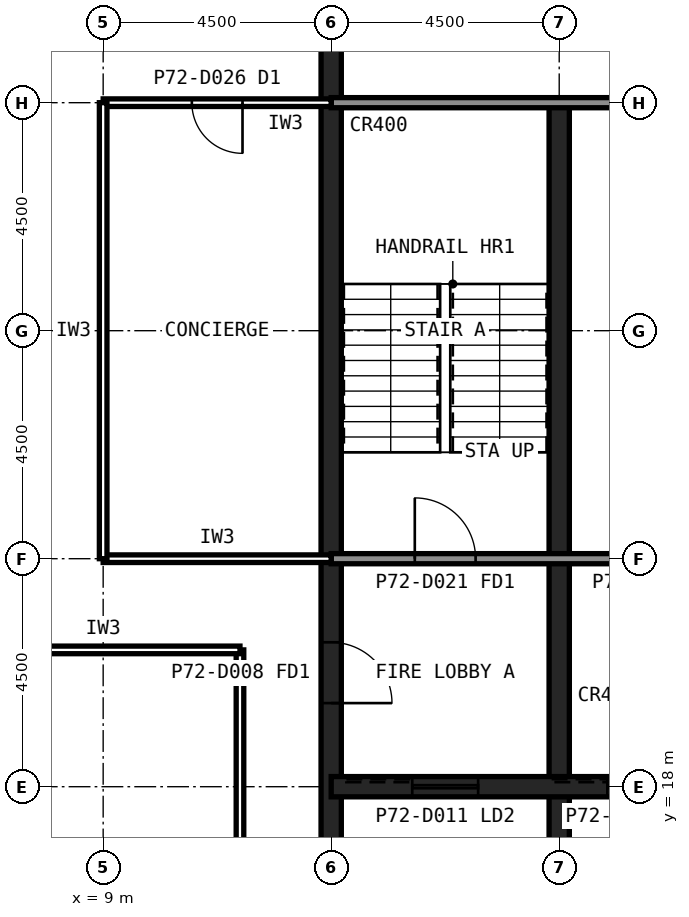
"""IFC4 building model, lengths in metres.
Left out: names, types, materials, properties, quantities, classifications, styles, units other than length and angle.
Written with IfcOpenShell. Run it as: python <this file> out.ifc"""

import sys

from ifc_helpers import new_model, si_unit, direction, frame, frame_2d, origin, place, context, subcontext, project, spatial, rectangle, extrude, element, fill, save


model = new_model("IFC4")
c1 = context("Model", 3, precision=1e-05, world=origin(), true_north=direction((0.0, 1.0)))
c2 = subcontext(c1, "Body", "Model", "MODEL_VIEW")
j1 = project(units=[si_unit("LENGTHUNIT", "METRE"), si_unit("PLANEANGLEUNIT", "RADIAN")], contexts=[c1])
p1 = place(None, origin())
s1 = spatial("IfcSite", under=j1, at=p1, CompositionType="ELEMENT")
p2 = place(p1, origin())
s2 = spatial("IfcBuilding", under=s1, at=p2, CompositionType="ELEMENT")
p3 = place(p2, frame((0.0, 0.0, 302.6)))
s3 = spatial("IfcBuildingStorey", under=s2, at=p3, CompositionType="ELEMENT", Elevation=302.6)
p4 = place(p3, frame((13.5, 40.5, 0.0), z_axis=(0.0, 0.0, 1.0), x_axis=(0.0, -1.0, 0.0)))
e1 = element("IfcWall", 1, at=p4, inside=s3, PredefinedType="SHEAR", context=c2, shape_type="SweptSolid", body=[
    extrude(rectangle(XDim=27.0, YDim=0.4, at=frame_2d((13.5, 0.0))), origin(), (0.0, 0.0, 1.0), 4.0),
])
p5 = place(p4, frame((19.65, 0.0, 0.0)))
e2 = element("IfcOpeningElement", 2, at=p5, cuts=e1, PredefinedType="OPENING", context=c2, shape_type="SweptSolid", body=[
    extrude(rectangle(XDim=1.2, YDim=2.1, at=frame_2d((0.6, 1.05))), frame((0.0, 0.21, 0.0), z_axis=(0.0, -1.0, 0.0), x_axis=(1.0, 0.0, 0.0)), (0.0, 0.0, 1.0), 0.42),
])
p6 = place(p4, frame((5.85, 0.0, 0.0)))
e3 = element("IfcOpeningElement", 3, at=p6, cuts=e1, PredefinedType="OPENING", context=c2, shape_type="SweptSolid", body=[
    extrude(rectangle(XDim=1.8, YDim=2.1, at=frame_2d((0.9, 1.05))), frame((0.0, 0.21, 0.0), z_axis=(0.0, -1.0, 0.0), x_axis=(1.0, 0.0, 0.0)), (0.0, 0.0, 1.0), 0.42),
])
p7 = place(p3, frame((18.0, 13.5, 0.0), z_axis=(0.0, 0.0, 1.0), x_axis=(0.0, 1.0, 0.0)))
e4 = element("IfcWall", 4, at=p7, inside=s3, PredefinedType="SHEAR", context=c2, shape_type="SweptSolid", body=[
    extrude(rectangle(XDim=18.0, YDim=0.4, at=frame_2d((9.0, 0.0))), origin(), (0.0, 0.0, 1.0), 4.0),
])
p8 = place(p3, frame((13.5, 18.0, 0.0), z_axis=(0.0, 0.0, 1.0), x_axis=(1.0, 0.0, 0.0)))
e5 = element("IfcWall", 5, at=p8, inside=s3, PredefinedType="SHEAR", context=c2, shape_type="SweptSolid", body=[
    extrude(rectangle(XDim=27.0, YDim=0.4, at=frame_2d((13.5, 0.0))), origin(), (0.0, 0.0, 1.0), 4.0),
])
p9 = place(p8, frame((24.3, 0.0, 0.0)))
e6 = element("IfcOpeningElement", 6, at=p9, cuts=e5, PredefinedType="OPENING", context=c2, shape_type="SweptSolid", body=[
    extrude(rectangle(XDim=0.9, YDim=2.1, at=frame_2d((0.45, 1.05))), frame((0.0, 0.21, 0.0), z_axis=(0.0, -1.0, 0.0), x_axis=(1.0, 0.0, 0.0)), (0.0, 0.0, 1.0), 0.42),
])
p10 = place(p8, frame((5.45, 0.0, 0.0)))
e7 = element("IfcOpeningElement", 7, at=p10, cuts=e5, PredefinedType="OPENING", context=c2, shape_type="SweptSolid", body=[
    extrude(rectangle(XDim=1.1, YDim=2.1, at=frame_2d((0.55, 1.05))), frame((0.0, 0.21, 0.0), z_axis=(0.0, -1.0, 0.0), x_axis=(1.0, 0.0, 0.0)), (0.0, 0.0, 1.0), 0.42),
])
p11 = place(p8, frame((8.45, 0.0, 0.0)))
e8 = element("IfcOpeningElement", 8, at=p11, cuts=e5, PredefinedType="OPENING", context=c2, shape_type="SweptSolid", body=[
    extrude(rectangle(XDim=1.1, YDim=2.1, at=frame_2d((0.55, 1.05))), frame((0.0, 0.21, 0.0), z_axis=(0.0, -1.0, 0.0), x_axis=(1.0, 0.0, 0.0)), (0.0, 0.0, 1.0), 0.42),
])
p12 = place(p8, frame((11.45, 0.0, 0.0)))
e9 = element("IfcOpeningElement", 9, at=p12, cuts=e5, PredefinedType="OPENING", context=c2, shape_type="SweptSolid", body=[
    extrude(rectangle(XDim=1.1, YDim=2.1, at=frame_2d((0.55, 1.05))), frame((0.0, 0.21, 0.0), z_axis=(0.0, -1.0, 0.0), x_axis=(1.0, 0.0, 0.0)), (0.0, 0.0, 1.0), 0.42),
])
p13 = place(p8, frame((14.45, 0.0, 0.0)))
e10 = element("IfcOpeningElement", 10, at=p13, cuts=e5, PredefinedType="OPENING", context=c2, shape_type="SweptSolid", body=[
    extrude(rectangle(XDim=1.1, YDim=2.1, at=frame_2d((0.55, 1.05))), frame((0.0, 0.21, 0.0), z_axis=(0.0, -1.0, 0.0), x_axis=(1.0, 0.0, 0.0)), (0.0, 0.0, 1.0), 0.42),
])
p14 = place(p8, frame((17.45, 0.0, 0.0)))
e11 = element("IfcOpeningElement", 11, at=p14, cuts=e5, PredefinedType="OPENING", context=c2, shape_type="SweptSolid", body=[
    extrude(rectangle(XDim=1.1, YDim=2.1, at=frame_2d((0.55, 1.05))), frame((0.0, 0.21, 0.0), z_axis=(0.0, -1.0, 0.0), x_axis=(1.0, 0.0, 0.0)), (0.0, 0.0, 1.0), 0.42),
])
p15 = place(p8, frame((20.45, 0.0, 0.0)))
e12 = element("IfcOpeningElement", 12, at=p15, cuts=e5, PredefinedType="OPENING", context=c2, shape_type="SweptSolid", body=[
    extrude(rectangle(XDim=1.1, YDim=2.1, at=frame_2d((0.55, 1.05))), frame((0.0, 0.21, 0.0), z_axis=(0.0, -1.0, 0.0), x_axis=(1.0, 0.0, 0.0)), (0.0, 0.0, 1.0), 0.42),
])
p16 = place(p8, frame((1.6, 0.0, 0.0)))
e13 = element("IfcOpeningElement", 13, at=p16, cuts=e5, PredefinedType="OPENING", context=c2, shape_type="SweptSolid", body=[
    extrude(rectangle(XDim=1.3, YDim=2.2, at=frame_2d((0.65, 1.1))), frame((0.0, 0.21, 0.0), z_axis=(0.0, -1.0, 0.0), x_axis=(1.0, 0.0, 0.0)), (0.0, 0.0, 1.0), 0.42),
])
p17 = place(p3, frame((13.5, 22.5, 0.0), z_axis=(0.0, 0.0, 1.0), x_axis=(1.0, 0.0, 0.0)))
e14 = element("IfcWall", 14, at=p17, inside=s3, PredefinedType="SOLIDWALL", context=c2, shape_type="SweptSolid", body=[
    extrude(rectangle(XDim=27.0, YDim=0.2, at=frame_2d((13.5, 0.0))), origin(), (0.0, 0.0, 1.0), 3.84),
])
p18 = place(p17, frame((1.65, 0.0, 0.0)))
e15 = element("IfcOpeningElement", 15, at=p18, cuts=e14, PredefinedType="OPENING", context=c2, shape_type="SweptSolid", body=[
    extrude(rectangle(XDim=1.2, YDim=2.1, at=frame_2d((0.6, 1.05))), frame((0.0, 0.11, 0.0), z_axis=(0.0, -1.0, 0.0), x_axis=(1.0, 0.0, 0.0)), (0.0, 0.0, 1.0), 0.22),
])
p19 = place(p17, frame((6.025, 0.0, 0.0)))
e16 = element("IfcOpeningElement", 16, at=p19, cuts=e14, PredefinedType="OPENING", context=c2, shape_type="SweptSolid", body=[
    extrude(rectangle(XDim=1.0, YDim=2.1, at=frame_2d((0.5, 1.05))), frame((0.0, 0.11, 0.0), z_axis=(0.0, -1.0, 0.0), x_axis=(1.0, 0.0, 0.0)), (0.0, 0.0, 1.0), 0.22),
])
p20 = place(p17, frame((10.525, 0.0, 0.0)))
e17 = element("IfcOpeningElement", 17, at=p20, cuts=e14, PredefinedType="OPENING", context=c2, shape_type="SweptSolid", body=[
    extrude(rectangle(XDim=1.0, YDim=2.1, at=frame_2d((0.5, 1.05))), frame((0.0, 0.11, 0.0), z_axis=(0.0, -1.0, 0.0), x_axis=(1.0, 0.0, 0.0)), (0.0, 0.0, 1.0), 0.22),
])
p21 = place(p17, frame((19.75, 0.0, 0.0)))
e18 = element("IfcOpeningElement", 18, at=p21, cuts=e14, PredefinedType="OPENING", context=c2, shape_type="SweptSolid", body=[
    extrude(rectangle(XDim=1.0, YDim=2.1, at=frame_2d((0.5, 1.05))), frame((0.0, 0.11, 0.0), z_axis=(0.0, -1.0, 0.0), x_axis=(1.0, 0.0, 0.0)), (0.0, 0.0, 1.0), 0.22),
])
p22 = place(p17, frame((15.05, 0.0, 0.0)))
e19 = element("IfcOpeningElement", 19, at=p22, cuts=e14, PredefinedType="OPENING", context=c2, shape_type="SweptSolid", body=[
    extrude(rectangle(XDim=1.4, YDim=2.4, at=frame_2d((0.7, 1.2))), frame((0.0, 0.11, 0.0), z_axis=(0.0, -1.0, 0.0), x_axis=(1.0, 0.0, 0.0)), (0.0, 0.0, 1.0), 0.22),
])
p23 = place(p3, frame((13.5, 31.5, 0.0), z_axis=(0.0, 0.0, 1.0), x_axis=(1.0, 0.0, 0.0)))
e20 = element("IfcWall", 20, at=p23, inside=s3, PredefinedType="SOLIDWALL", context=c2, shape_type="SweptSolid", body=[
    extrude(rectangle(XDim=27.0, YDim=0.2, at=frame_2d((13.5, 0.0))), origin(), (0.0, 0.0, 1.0), 3.84),
])
p24 = place(p23, frame((24.15, 0.0, 0.0)))
e21 = element("IfcOpeningElement", 21, at=p24, cuts=e20, PredefinedType="OPENING", context=c2, shape_type="SweptSolid", body=[
    extrude(rectangle(XDim=1.2, YDim=2.1, at=frame_2d((0.6, 1.05))), frame((0.0, 0.11, 0.0), z_axis=(0.0, -1.0, 0.0), x_axis=(1.0, 0.0, 0.0)), (0.0, 0.0, 1.0), 0.22),
])
p25 = place(p23, frame((15.3, 0.0, 0.0)))
e22 = element("IfcOpeningElement", 22, at=p25, cuts=e20, PredefinedType="OPENING", context=c2, shape_type="SweptSolid", body=[
    extrude(rectangle(XDim=0.9, YDim=2.1, at=frame_2d((0.45, 1.05))), frame((0.0, 0.11, 0.0), z_axis=(0.0, -1.0, 0.0), x_axis=(1.0, 0.0, 0.0)), (0.0, 0.0, 1.0), 0.22),
])
p26 = place(p23, frame((19.8, 0.0, 0.0)))
e23 = element("IfcOpeningElement", 23, at=p26, cuts=e20, PredefinedType="OPENING", context=c2, shape_type="SweptSolid", body=[
    extrude(rectangle(XDim=0.9, YDim=2.1, at=frame_2d((0.45, 1.05))), frame((0.0, 0.11, 0.0), z_axis=(0.0, -1.0, 0.0), x_axis=(1.0, 0.0, 0.0)), (0.0, 0.0, 1.0), 0.22),
])
p27 = place(p3, frame((11.7, 20.7, 0.0), z_axis=(0.0, 0.0, 1.0), x_axis=(0.0, -1.0, 0.0)))
e24 = element("IfcWall", 24, at=p27, inside=s3, PredefinedType="PARTITIONING", context=c2, shape_type="SweptSolid", body=[
    extrude(rectangle(XDim=9.0, YDim=0.15, at=frame_2d((4.5, 0.0))), origin(), (0.0, 0.0, 1.0), 3.84),
])
p28 = place(p3, frame((6.3, 20.7, 0.0), z_axis=(0.0, 0.0, 1.0), x_axis=(1.0, 0.0, 0.0)))
e25 = element("IfcWall", 25, at=p28, inside=s3, PredefinedType="PARTITIONING", context=c2, shape_type="SweptSolid", body=[
    extrude(rectangle(XDim=5.4, YDim=0.15, at=frame_2d((2.7, 0.0))), origin(), (0.0, 0.0, 1.0), 3.84),
])
p29 = place(p3, frame((9.0, 22.5, 0.0), z_axis=(0.0, 0.0, 1.0), x_axis=(1.0, 0.0, 0.0)))
e26 = element("IfcWall", 26, at=p29, inside=s3, PredefinedType="PARTITIONING", context=c2, shape_type="SweptSolid", body=[
    extrude(rectangle(XDim=4.5, YDim=0.15, at=frame_2d((2.25, 0.0))), origin(), (0.0, 0.0, 1.0), 2.989),
])
p30 = place(p3, frame((13.5, 31.5, 0.0), z_axis=(0.0, 0.0, 1.0), x_axis=(-1.0, 0.0, 0.0)))
e27 = element("IfcWall", 27, at=p30, inside=s3, PredefinedType="PARTITIONING", context=c2, shape_type="SweptSolid", body=[
    extrude(rectangle(XDim=4.5, YDim=0.15, at=frame_2d((2.25, 0.0))), origin(), (0.0, 0.0, 1.0), 2.989),
])
p31 = place(p30, frame((1.75, 0.0, 0.0)))
e28 = element("IfcOpeningElement", 28, at=p31, cuts=e27, PredefinedType="OPENING", context=c2, shape_type="SweptSolid", body=[
    extrude(rectangle(XDim=1.0, YDim=2.1, at=frame_2d((0.5, 1.05))), frame((0.0, 0.085, 0.0), z_axis=(0.0, -1.0, 0.0), x_axis=(1.0, 0.0, 0.0)), (0.0, 0.0, 1.0), 0.17),
])
p32 = place(p3, frame((9.0, 31.5, 0.0), z_axis=(0.0, 0.0, 1.0), x_axis=(0.0, -1.0, 0.0)))
e29 = element("IfcWall", 29, at=p32, inside=s3, PredefinedType="PARTITIONING", context=c2, shape_type="SweptSolid", body=[
    extrude(rectangle(XDim=9.0, YDim=0.15, at=frame_2d((4.5, 0.0))), origin(), (0.0, 0.0, 1.0), 3.84),
])
p33 = place(p5, origin())
e30 = element("IfcDoor", 30, at=p33, inside=s3, OperationType="SINGLE_SWING_RIGHT", PredefinedType="DOOR", context=c2, shape_type="SweptSolid", body=[
    extrude(rectangle(XDim=1.2, YDim=2.1, at=frame_2d((0.6, 1.05))), frame((0.0, 0.025, 0.0), z_axis=(0.0, -1.0, 0.0), x_axis=(1.0, 0.0, 0.0)), (0.0, 0.0, 1.0), 0.05),
])
fill(e2, e30)
p34 = place(p18, origin())
e31 = element("IfcDoor", 31, at=p34, inside=s3, OperationType="SINGLE_SWING_LEFT", PredefinedType="DOOR", context=c2, shape_type="SweptSolid", body=[
    extrude(rectangle(XDim=1.2, YDim=2.1, at=frame_2d((0.6, 1.05))), frame((0.0, 0.025, 0.0), z_axis=(0.0, -1.0, 0.0), x_axis=(1.0, 0.0, 0.0)), (0.0, 0.0, 1.0), 0.05),
])
fill(e15, e31)
p35 = place(p10, origin())
e32 = element("IfcDoor", 32, at=p35, inside=s3, OperationType="SLIDING_TO_LEFT", PredefinedType="DOOR", context=c2, shape_type="SweptSolid", body=[
    extrude(rectangle(XDim=1.1, YDim=2.1, at=frame_2d((0.55, 1.05))), frame((0.0, 0.025, 0.0), z_axis=(0.0, -1.0, 0.0), x_axis=(1.0, 0.0, 0.0)), (0.0, 0.0, 1.0), 0.05),
])
fill(e7, e32)
p36 = place(p16, origin())
e33 = element("IfcDoor", 33, at=p36, inside=s3, OperationType="SLIDING_TO_LEFT", PredefinedType="DOOR", context=c2, shape_type="SweptSolid", body=[
    extrude(rectangle(XDim=1.3, YDim=2.2, at=frame_2d((0.65, 1.1))), frame((0.0, 0.025, 0.0), z_axis=(0.0, -1.0, 0.0), x_axis=(1.0, 0.0, 0.0)), (0.0, 0.0, 1.0), 0.05),
])
fill(e13, e33)
p37 = place(p31, origin())
e34 = element("IfcDoor", 34, at=p37, inside=s3, OperationType="SINGLE_SWING_LEFT", PredefinedType="DOOR", context=c2, shape_type="SweptSolid", body=[
    extrude(rectangle(XDim=1.0, YDim=2.1, at=frame_2d((0.5, 1.05))), frame((0.0, 0.025, 0.0), z_axis=(0.0, -1.0, 0.0), x_axis=(1.0, 0.0, 0.0)), (0.0, 0.0, 1.0), 0.05),
])
fill(e28, e34)
save(model, sys.argv[1])
